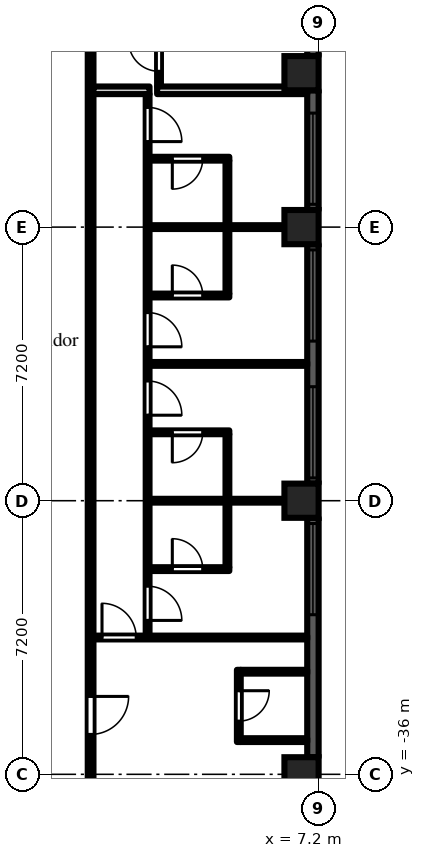
"""IFC4 building model, lengths in metres.
Left out: names, types, materials, properties, quantities, classifications, styles, units other than length and angle.
Written with IfcOpenShell. Run it as: python <this file> out.ifc"""

import sys

from ifc_helpers import new_model, si_unit, direction, frame, frame_2d, origin, origin_2d, place, context, subcontext, project, spatial, rectangle, extrude, element, fill, save


model = new_model("IFC4")
c1 = context("Model", 3, precision=1e-05, world=origin(), true_north=direction((0.0, 1.0)))
c2 = subcontext(c1, "Body", "Model", "MODEL_VIEW")
j1 = project(units=[si_unit("LENGTHUNIT", "METRE"), si_unit("PLANEANGLEUNIT", "RADIAN")], contexts=[c1])
p1 = place(None, origin())
s1 = spatial("IfcSite", under=j1, at=p1, CompositionType="ELEMENT")
p2 = place(p1, origin())
s2 = spatial("IfcBuilding", under=s1, at=p2, CompositionType="ELEMENT")
p3 = place(p2, frame((0.0, 0.0, 69.9)))
s3 = spatial("IfcBuildingStorey", under=s2, at=p3, CompositionType="ELEMENT", Elevation=69.9)
for number, where, z_axis, x_axis in (
    (1, (6.75, -36.0, 0.0), (0.0, 0.0, 1.0), (1.0, 0.0, 0.0)),
    (2, (6.75, -28.8, 0.0), (0.0, 0.0, 1.0), (1.0, 0.0, 0.0)),
    (3, (6.75, -21.6, 0.0), (0.0, 0.0, 1.0), (1.0, 0.0, 0.0)),
    (4, (6.75, -17.55, 0.0), (0.0, 0.0, 1.0), (1.0, 0.0, 0.0)),
):
    element("IfcColumn", number, at=place(p3, frame(where, z_axis=z_axis, x_axis=x_axis)), inside=s3, PredefinedType="COLUMN", context=c2, shape_type="SweptSolid", body=[
        extrude(rectangle(XDim=0.9, YDim=0.9, at=origin_2d()), origin(), (0.0, 0.0, 1.0), 3.0),
    ])
p4 = place(p3, frame((7.05, -35.55, 0.0), z_axis=(0.0, 0.0, 1.0), x_axis=(0.0, 1.0, 0.0)))
e5 = element("IfcWall", 5, at=p4, inside=s3, PredefinedType="SOLIDWALL", context=c2, shape_type="SweptSolid", body=[
    extrude(rectangle(XDim=6.3, YDim=0.3, at=frame_2d((3.15, 0.0))), origin(), (0.0, 0.0, 1.0), 2.1),
])
p5 = place(p4, frame((3.75, 0.0, 0.2)))
e6 = element("IfcOpeningElement", 6, at=p5, cuts=e5, PredefinedType="OPENING", context=c2, shape_type="SweptSolid", body=[
    extrude(rectangle(XDim=2.4, YDim=1.85, at=frame_2d((1.2, 0.925))), frame((0.0, 0.16, 0.0), z_axis=(0.0, -1.0, 0.0), x_axis=(1.0, 0.0, 0.0)), (0.0, 0.0, 1.0), 0.32),
])
p6 = place(p3, frame((7.05, -28.35, 0.0), z_axis=(0.0, 0.0, 1.0), x_axis=(0.0, 1.0, 0.0)))
e7 = element("IfcWall", 7, at=p6, inside=s3, PredefinedType="SOLIDWALL", context=c2, shape_type="SweptSolid", body=[
    extrude(rectangle(XDim=6.3, YDim=0.3, at=frame_2d((3.15, 0.0))), origin(), (0.0, 0.0, 1.0), 2.1),
])
p7 = place(p6, frame((0.15, 0.0, 0.2)))
e8 = element("IfcOpeningElement", 8, at=p7, cuts=e7, PredefinedType="OPENING", context=c2, shape_type="SweptSolid", body=[
    extrude(rectangle(XDim=2.4, YDim=1.85, at=frame_2d((1.2, 0.925))), frame((0.0, 0.16, 0.0), z_axis=(0.0, -1.0, 0.0), x_axis=(1.0, 0.0, 0.0)), (0.0, 0.0, 1.0), 0.32),
])
p8 = place(p6, frame((3.75, 0.0, 0.2)))
e9 = element("IfcOpeningElement", 9, at=p8, cuts=e7, PredefinedType="OPENING", context=c2, shape_type="SweptSolid", body=[
    extrude(rectangle(XDim=2.4, YDim=1.85, at=frame_2d((1.2, 0.925))), frame((0.0, 0.16, 0.0), z_axis=(0.0, -1.0, 0.0), x_axis=(1.0, 0.0, 0.0)), (0.0, 0.0, 1.0), 0.32),
])
p9 = place(p3, frame((7.05, -21.15, 0.0), z_axis=(0.0, 0.0, 1.0), x_axis=(0.0, 1.0, 0.0)))
e10 = element("IfcWall", 10, at=p9, inside=s3, PredefinedType="SOLIDWALL", context=c2, shape_type="SweptSolid", body=[
    extrude(rectangle(XDim=3.15, YDim=0.3, at=frame_2d((1.575, 0.0))), origin(), (0.0, 0.0, 1.0), 2.1),
])
p10 = place(p9, frame((0.15, 0.0, 0.2)))
e11 = element("IfcOpeningElement", 11, at=p10, cuts=e10, PredefinedType="OPENING", context=c2, shape_type="SweptSolid", body=[
    extrude(rectangle(XDim=2.4, YDim=1.85, at=frame_2d((1.2, 0.925))), frame((0.0, 0.16, 0.0), z_axis=(0.0, -1.0, 0.0), x_axis=(1.0, 0.0, 0.0)), (0.0, 0.0, 1.0), 0.32),
])
p11 = place(p3, frame((7.05, -17.1, 0.0), z_axis=(0.0, 0.0, 1.0), x_axis=(0.0, 1.0, 0.0)))
e12 = element("IfcWall", 12, at=p11, inside=s3, PredefinedType="SOLIDWALL", context=c2, shape_type="SweptSolid", body=[
    extrude(rectangle(XDim=1.8, YDim=0.3, at=frame_2d((0.9, 0.0))), origin(), (0.0, 0.0, 1.0), 2.1),
])
p12 = place(p11, frame((0.3, 0.0, 0.2)))
e13 = element("IfcOpeningElement", 13, at=p12, cuts=e12, PredefinedType="OPENING", context=c2, shape_type="SweptSolid", body=[
    extrude(rectangle(XDim=1.2, YDim=1.85, at=frame_2d((0.6, 0.925))), frame((0.0, 0.16, 0.0), z_axis=(0.0, -1.0, 0.0), x_axis=(1.0, 0.0, 0.0)), (0.0, 0.0, 1.0), 0.32),
])
p13 = place(p3, frame((1.2, -36.5, 0.0), z_axis=(0.0, 0.0, 1.0), x_axis=(0.0, 1.0, 0.0)))
e14 = element("IfcWall", 14, at=p13, inside=s3, PredefinedType="PARTITIONING", context=c2, shape_type="SweptSolid", body=[
    extrude(rectangle(XDim=35.375, YDim=0.15, at=frame_2d((17.688, 0.0))), origin(), (0.0, 0.0, 1.0), 2.575),
])
p14 = place(p13, frame((31.85, 0.0, 0.0)))
e15 = element("IfcOpeningElement", 15, at=p14, cuts=e14, PredefinedType="OPENING", context=c2, shape_type="SweptSolid", body=[
    extrude(rectangle(XDim=0.9, YDim=2.1, at=frame_2d((0.45, 1.05))), frame((0.0, 0.085, 0.0), z_axis=(0.0, -1.0, 0.0), x_axis=(1.0, 0.0, 0.0)), (0.0, 0.0, 1.0), 0.17),
])
p15 = place(p13, frame((23.05, 0.0, 0.0)))
e16 = element("IfcOpeningElement", 16, at=p15, cuts=e14, PredefinedType="OPENING", context=c2, shape_type="SweptSolid", body=[
    extrude(rectangle(XDim=0.9, YDim=2.1, at=frame_2d((0.45, 1.05))), frame((0.0, 0.085, 0.0), z_axis=(0.0, -1.0, 0.0), x_axis=(1.0, 0.0, 0.0)), (0.0, 0.0, 1.0), 0.17),
])
p16 = place(p13, frame((26.65, 0.0, 0.0)))
e17 = element("IfcOpeningElement", 17, at=p16, cuts=e14, PredefinedType="OPENING", context=c2, shape_type="SweptSolid", body=[
    extrude(rectangle(XDim=0.9, YDim=2.1, at=frame_2d((0.45, 1.05))), frame((0.0, 0.085, 0.0), z_axis=(0.0, -1.0, 0.0), x_axis=(1.0, 0.0, 0.0)), (0.0, 0.0, 1.0), 0.17),
])
p17 = place(p13, frame((20.5, 0.0, 0.0)))
e18 = element("IfcOpeningElement", 18, at=p17, cuts=e14, PredefinedType="OPENING", context=c2, shape_type="SweptSolid", body=[
    extrude(rectangle(XDim=1.0, YDim=2.1, at=frame_2d((0.5, 1.05))), frame((0.0, 0.085, 0.0), z_axis=(0.0, -1.0, 0.0), x_axis=(1.0, 0.0, 0.0)), (0.0, 0.0, 1.0), 0.17),
])
p18 = place(p13, frame((1.55, 0.0, 0.0)))
e19 = element("IfcOpeningElement", 19, at=p18, cuts=e14, PredefinedType="OPENING", context=c2, shape_type="SweptSolid", body=[
    extrude(rectangle(XDim=1.0, YDim=2.1, at=frame_2d((0.5, 1.05))), frame((0.0, 0.085, 0.0), z_axis=(0.0, -1.0, 0.0), x_axis=(1.0, 0.0, 0.0)), (0.0, 0.0, 1.0), 0.17),
])
p19 = place(p3, frame((1.275, -32.4, 0.0), z_axis=(0.0, 0.0, 1.0), x_axis=(1.0, 0.0, 0.0)))
e20 = element("IfcWall", 20, at=p19, inside=s3, PredefinedType="PARTITIONING", context=c2, shape_type="SweptSolid", body=[
    extrude(rectangle(XDim=5.625, YDim=0.1, at=frame_2d((2.812, 0.0))), origin(), (0.0, 0.0, 1.0), 2.575),
])
p20 = place(p19, frame((0.225, 0.0, 0.0)))
e21 = element("IfcOpeningElement", 21, at=p20, cuts=e20, PredefinedType="OPENING", context=c2, shape_type="SweptSolid", body=[
    extrude(rectangle(XDim=0.9, YDim=2.1, at=frame_2d((0.45, 1.05))), frame((0.0, 0.06, 0.0), z_axis=(0.0, -1.0, 0.0), x_axis=(1.0, 0.0, 0.0)), (0.0, 0.0, 1.0), 0.12),
])
p21 = place(p3, frame((1.275, -18.0, 0.0), z_axis=(0.0, 0.0, 1.0), x_axis=(1.0, 0.0, 0.0)))
e22 = element("IfcWall", 22, at=p21, inside=s3, PredefinedType="PARTITIONING", context=c2, shape_type="SweptSolid", body=[
    extrude(rectangle(XDim=1.475, YDim=0.2, at=frame_2d((0.738, 0.0))), origin(), (0.0, 0.0, 1.0), 2.575),
])
p22 = place(p3, frame((2.7, -32.35, 0.0), z_axis=(0.0, 0.0, 1.0), x_axis=(0.0, 1.0, 0.0)))
e23 = element("IfcWall", 23, at=p22, inside=s3, PredefinedType="PARTITIONING", context=c2, shape_type="SweptSolid", body=[
    extrude(rectangle(XDim=14.25, YDim=0.1, at=frame_2d((7.125, 0.0))), origin(), (0.0, 0.0, 1.0), 2.575),
])
p23 = place(p22, frame((0.4, 0.0, 0.0)))
e24 = element("IfcOpeningElement", 24, at=p23, cuts=e23, PredefinedType="OPENING", context=c2, shape_type="SweptSolid", body=[
    extrude(rectangle(XDim=0.9, YDim=2.1, at=frame_2d((0.45, 1.05))), frame((0.0, 0.06, 0.0), z_axis=(0.0, -1.0, 0.0), x_axis=(1.0, 0.0, 0.0)), (0.0, 0.0, 1.0), 0.12),
])
p24 = place(p22, frame((5.8, 0.0, 0.0)))
e25 = element("IfcOpeningElement", 25, at=p24, cuts=e23, PredefinedType="OPENING", context=c2, shape_type="SweptSolid", body=[
    extrude(rectangle(XDim=0.9, YDim=2.1, at=frame_2d((0.45, 1.05))), frame((0.0, 0.06, 0.0), z_axis=(0.0, -1.0, 0.0), x_axis=(1.0, 0.0, 0.0)), (0.0, 0.0, 1.0), 0.12),
])
p25 = place(p22, frame((7.6, 0.0, 0.0)))
e26 = element("IfcOpeningElement", 26, at=p25, cuts=e23, PredefinedType="OPENING", context=c2, shape_type="SweptSolid", body=[
    extrude(rectangle(XDim=0.9, YDim=2.1, at=frame_2d((0.45, 1.05))), frame((0.0, 0.06, 0.0), z_axis=(0.0, -1.0, 0.0), x_axis=(1.0, 0.0, 0.0)), (0.0, 0.0, 1.0), 0.12),
])
p26 = place(p22, frame((13.0, 0.0, 0.0)))
e27 = element("IfcOpeningElement", 27, at=p26, cuts=e23, PredefinedType="OPENING", context=c2, shape_type="SweptSolid", body=[
    extrude(rectangle(XDim=0.9, YDim=2.1, at=frame_2d((0.45, 1.05))), frame((0.0, 0.06, 0.0), z_axis=(0.0, -1.0, 0.0), x_axis=(1.0, 0.0, 0.0)), (0.0, 0.0, 1.0), 0.12),
])
p27 = place(p3, frame((2.75, -30.6, 0.0), z_axis=(0.0, 0.0, 1.0), x_axis=(1.0, 0.0, 0.0)))
e28 = element("IfcWall", 28, at=p27, inside=s3, PredefinedType="PARTITIONING", context=c2, shape_type="SweptSolid", body=[
    extrude(rectangle(XDim=2.1, YDim=0.1, at=frame_2d((1.05, 0.0))), origin(), (0.0, 0.0, 1.0), 2.575),
])
p28 = place(p27, frame((0.6, 0.0, 0.0)))
e29 = element("IfcOpeningElement", 29, at=p28, cuts=e28, PredefinedType="OPENING", context=c2, shape_type="SweptSolid", body=[
    extrude(rectangle(XDim=0.8, YDim=2.1, at=frame_2d((0.4, 1.05))), frame((0.0, 0.06, 0.0), z_axis=(0.0, -1.0, 0.0), x_axis=(1.0, 0.0, 0.0)), (0.0, 0.0, 1.0), 0.12),
])
p29 = place(p3, frame((2.75, -28.8, 0.0), z_axis=(0.0, 0.0, 1.0), x_axis=(1.0, 0.0, 0.0)))
e30 = element("IfcWall", 30, at=p29, inside=s3, PredefinedType="PARTITIONING", context=c2, shape_type="SweptSolid", body=[
    extrude(rectangle(XDim=4.15, YDim=0.1, at=frame_2d((2.075, 0.0))), origin(), (0.0, 0.0, 1.0), 2.575),
])
p30 = place(p3, frame((2.75, -27.0, 0.0), z_axis=(0.0, 0.0, 1.0), x_axis=(1.0, 0.0, 0.0)))
e31 = element("IfcWall", 31, at=p30, inside=s3, PredefinedType="PARTITIONING", context=c2, shape_type="SweptSolid", body=[
    extrude(rectangle(XDim=2.1, YDim=0.1, at=frame_2d((1.05, 0.0))), origin(), (0.0, 0.0, 1.0), 2.575),
])
p31 = place(p30, frame((0.6, 0.0, 0.0)))
e32 = element("IfcOpeningElement", 32, at=p31, cuts=e31, PredefinedType="OPENING", context=c2, shape_type="SweptSolid", body=[
    extrude(rectangle(XDim=0.8, YDim=2.1, at=frame_2d((0.4, 1.05))), frame((0.0, 0.06, 0.0), z_axis=(0.0, -1.0, 0.0), x_axis=(1.0, 0.0, 0.0)), (0.0, 0.0, 1.0), 0.12),
])
p32 = place(p3, frame((2.75, -25.2, 0.0), z_axis=(0.0, 0.0, 1.0), x_axis=(1.0, 0.0, 0.0)))
e33 = element("IfcWall", 33, at=p32, inside=s3, PredefinedType="PARTITIONING", context=c2, shape_type="SweptSolid", body=[
    extrude(rectangle(XDim=4.15, YDim=0.1, at=frame_2d((2.075, 0.0))), origin(), (0.0, 0.0, 1.0), 2.575),
])
p33 = place(p3, frame((2.75, -23.4, 0.0), z_axis=(0.0, 0.0, 1.0), x_axis=(1.0, 0.0, 0.0)))
e34 = element("IfcWall", 34, at=p33, inside=s3, PredefinedType="PARTITIONING", context=c2, shape_type="SweptSolid", body=[
    extrude(rectangle(XDim=2.1, YDim=0.1, at=frame_2d((1.05, 0.0))), origin(), (0.0, 0.0, 1.0), 2.575),
])
p34 = place(p33, frame((0.6, 0.0, 0.0)))
e35 = element("IfcOpeningElement", 35, at=p34, cuts=e34, PredefinedType="OPENING", context=c2, shape_type="SweptSolid", body=[
    extrude(rectangle(XDim=0.8, YDim=2.1, at=frame_2d((0.4, 1.05))), frame((0.0, 0.06, 0.0), z_axis=(0.0, -1.0, 0.0), x_axis=(1.0, 0.0, 0.0)), (0.0, 0.0, 1.0), 0.12),
])
p35 = place(p3, frame((2.75, -21.6, 0.0), z_axis=(0.0, 0.0, 1.0), x_axis=(1.0, 0.0, 0.0)))
e36 = element("IfcWall", 36, at=p35, inside=s3, PredefinedType="PARTITIONING", context=c2, shape_type="SweptSolid", body=[
    extrude(rectangle(XDim=4.15, YDim=0.1, at=frame_2d((2.075, 0.0))), origin(), (0.0, 0.0, 1.0), 2.575),
])
p36 = place(p3, frame((2.75, -19.8, 0.0), z_axis=(0.0, 0.0, 1.0), x_axis=(1.0, 0.0, 0.0)))
e37 = element("IfcWall", 37, at=p36, inside=s3, PredefinedType="PARTITIONING", context=c2, shape_type="SweptSolid", body=[
    extrude(rectangle(XDim=2.1, YDim=0.1, at=frame_2d((1.05, 0.0))), origin(), (0.0, 0.0, 1.0), 2.575),
])
p37 = place(p36, frame((0.6, 0.0, 0.0)))
e38 = element("IfcOpeningElement", 38, at=p37, cuts=e37, PredefinedType="OPENING", context=c2, shape_type="SweptSolid", body=[
    extrude(rectangle(XDim=0.8, YDim=2.1, at=frame_2d((0.4, 1.05))), frame((0.0, 0.06, 0.0), z_axis=(0.0, -1.0, 0.0), x_axis=(1.0, 0.0, 0.0)), (0.0, 0.0, 1.0), 0.12),
])
p38 = place(p3, frame((3.0, -17.9, 0.0), z_axis=(0.0, 0.0, 1.0), x_axis=(0.0, 1.0, 0.0)))
e39 = element("IfcWall", 39, at=p38, inside=s3, PredefinedType="PARTITIONING", context=c2, shape_type="SweptSolid", body=[
    extrude(rectangle(XDim=1.65, YDim=0.1, at=frame_2d((0.825, 0.0))), origin(), (0.0, 0.0, 1.0), 2.575),
])
p39 = place(p38, frame((0.4, 0.0, 0.0)))
e40 = element("IfcOpeningElement", 40, at=p39, cuts=e39, PredefinedType="OPENING", context=c2, shape_type="SweptSolid", body=[
    extrude(rectangle(XDim=0.8, YDim=2.1, at=frame_2d((0.4, 1.05))), frame((0.0, 0.06, 0.0), z_axis=(0.0, -1.0, 0.0), x_axis=(1.0, 0.0, 0.0)), (0.0, 0.0, 1.0), 0.12),
])
p40 = place(p3, frame((2.95, -18.0, 0.0), z_axis=(0.0, 0.0, 1.0), x_axis=(1.0, 0.0, 0.0)))
e41 = element("IfcWall", 41, at=p40, inside=s3, PredefinedType="PARTITIONING", context=c2, shape_type="SweptSolid", body=[
    extrude(rectangle(XDim=3.95, YDim=0.2, at=frame_2d((1.975, 0.0))), origin(), (0.0, 0.0, 1.0), 2.575),
])
for number, where, z_axis, x_axis in (
    (42, (4.8, -30.55, 0.0), (0.0, 0.0, 1.0), (0.0, 1.0, 0.0)),
    (43, (4.8, -23.35, 0.0), (0.0, 0.0, 1.0), (0.0, 1.0, 0.0)),
):
    element("IfcWall", number, at=place(p3, frame(where, z_axis=z_axis, x_axis=x_axis)), inside=s3, PredefinedType="PARTITIONING", context=c2, shape_type="SweptSolid", body=[
        extrude(rectangle(XDim=3.5, YDim=0.1, at=frame_2d((1.75, 0.0))), origin(), (0.0, 0.0, 1.0), 2.575),
    ])
p41 = place(p3, frame((5.1, -35.15, 0.0), z_axis=(0.0, 0.0, 1.0), x_axis=(0.0, 1.0, 0.0)))
e44 = element("IfcWall", 44, at=p41, inside=s3, PredefinedType="PARTITIONING", context=c2, shape_type="SweptSolid", body=[
    extrude(rectangle(XDim=1.9, YDim=0.1, at=frame_2d((0.95, 0.0))), origin(), (0.0, 0.0, 1.0), 2.575),
])
p42 = place(p41, frame((0.55, 0.0, 0.0)))
e45 = element("IfcOpeningElement", 45, at=p42, cuts=e44, PredefinedType="OPENING", context=c2, shape_type="SweptSolid", body=[
    extrude(rectangle(XDim=0.8, YDim=2.1, at=frame_2d((0.4, 1.05))), frame((0.0, 0.06, 0.0), z_axis=(0.0, -1.0, 0.0), x_axis=(1.0, 0.0, 0.0)), (0.0, 0.0, 1.0), 0.12),
])
for number, where, z_axis, x_axis in (
    (46, (5.15, -35.1, 0.0), (0.0, 0.0, 1.0), (1.0, 0.0, 0.0)),
    (47, (5.15, -33.3, 0.0), (0.0, 0.0, 1.0), (1.0, 0.0, 0.0)),
):
    element("IfcWall", number, at=place(p3, frame(where, z_axis=z_axis, x_axis=x_axis)), inside=s3, PredefinedType="PARTITIONING", context=c2, shape_type="SweptSolid", body=[
        extrude(rectangle(XDim=1.75, YDim=0.1, at=frame_2d((0.875, 0.0))), origin(), (0.0, 0.0, 1.0), 2.575),
    ])
p43 = place(p5, origin())
e48 = element("IfcWindow", 48, at=p43, inside=s3, PartitioningType="SINGLE_PANEL", PredefinedType="WINDOW", context=c2, shape_type="SweptSolid", body=[
    extrude(rectangle(XDim=2.4, YDim=1.85, at=frame_2d((1.2, 0.925))), frame((0.0, 0.03, 0.0), z_axis=(0.0, -1.0, 0.0), x_axis=(1.0, 0.0, 0.0)), (0.0, 0.0, 1.0), 0.06),
])
fill(e6, e48)
p44 = place(p7, origin())
e49 = element("IfcWindow", 49, at=p44, inside=s3, PartitioningType="SINGLE_PANEL", PredefinedType="WINDOW", context=c2, shape_type="SweptSolid", body=[
    extrude(rectangle(XDim=2.4, YDim=1.85, at=frame_2d((1.2, 0.925))), frame((0.0, 0.03, 0.0), z_axis=(0.0, -1.0, 0.0), x_axis=(1.0, 0.0, 0.0)), (0.0, 0.0, 1.0), 0.06),
])
fill(e8, e49)
p45 = place(p8, origin())
e50 = element("IfcWindow", 50, at=p45, inside=s3, PartitioningType="SINGLE_PANEL", PredefinedType="WINDOW", context=c2, shape_type="SweptSolid", body=[
    extrude(rectangle(XDim=2.4, YDim=1.85, at=frame_2d((1.2, 0.925))), frame((0.0, 0.03, 0.0), z_axis=(0.0, -1.0, 0.0), x_axis=(1.0, 0.0, 0.0)), (0.0, 0.0, 1.0), 0.06),
])
fill(e9, e50)
p46 = place(p10, origin())
e51 = element("IfcWindow", 51, at=p46, inside=s3, PartitioningType="SINGLE_PANEL", PredefinedType="WINDOW", context=c2, shape_type="SweptSolid", body=[
    extrude(rectangle(XDim=2.4, YDim=1.85, at=frame_2d((1.2, 0.925))), frame((0.0, 0.03, 0.0), z_axis=(0.0, -1.0, 0.0), x_axis=(1.0, 0.0, 0.0)), (0.0, 0.0, 1.0), 0.06),
])
fill(e11, e51)
p47 = place(p39, origin())
e52 = element("IfcDoor", 52, at=p47, inside=s3, OperationType="SINGLE_SWING_RIGHT", PredefinedType="DOOR", context=c2, shape_type="SweptSolid", body=[
    extrude(rectangle(XDim=0.8, YDim=2.1, at=frame_2d((0.4, 1.05))), frame((0.0, 0.025, 0.0), z_axis=(0.0, -1.0, 0.0), x_axis=(1.0, 0.0, 0.0)), (0.0, 0.0, 1.0), 0.05),
])
fill(e40, e52)
p48 = place(p42, frame((0.8, 0.0, 0.0), z_axis=(0.0, 0.0, 1.0), x_axis=(-1.0, 0.0, 0.0)))
e53 = element("IfcDoor", 53, at=p48, inside=s3, OperationType="SINGLE_SWING_LEFT", PredefinedType="DOOR", context=c2, shape_type="SweptSolid", body=[
    extrude(rectangle(XDim=0.8, YDim=2.1, at=frame_2d((0.4, 1.05))), frame((0.0, 0.025, 0.0), z_axis=(0.0, -1.0, 0.0), x_axis=(1.0, 0.0, 0.0)), (0.0, 0.0, 1.0), 0.05),
])
fill(e45, e53)
p49 = place(p18, frame((1.0, 0.0, 0.0), z_axis=(0.0, 0.0, 1.0), x_axis=(-1.0, 0.0, 0.0)))
e54 = element("IfcDoor", 54, at=p49, inside=s3, OperationType="SINGLE_SWING_LEFT", PredefinedType="DOOR", context=c2, shape_type="SweptSolid", body=[
    extrude(rectangle(XDim=1.0, YDim=2.1, at=frame_2d((0.5, 1.05))), frame((0.0, 0.025, 0.0), z_axis=(0.0, -1.0, 0.0), x_axis=(1.0, 0.0, 0.0)), (0.0, 0.0, 1.0), 0.05),
])
fill(e19, e54)
p50 = place(p20, origin())
e55 = element("IfcDoor", 55, at=p50, inside=s3, OperationType="SINGLE_SWING_LEFT", PredefinedType="DOOR", context=c2, shape_type="SweptSolid", body=[
    extrude(rectangle(XDim=0.9, YDim=2.1, at=frame_2d((0.45, 1.05))), frame((0.0, 0.025, 0.0), z_axis=(0.0, -1.0, 0.0), x_axis=(1.0, 0.0, 0.0)), (0.0, 0.0, 1.0), 0.05),
])
fill(e21, e55)
p51 = place(p23, frame((0.9, 0.0, 0.0), z_axis=(0.0, 0.0, 1.0), x_axis=(-1.0, 0.0, 0.0)))
e56 = element("IfcDoor", 56, at=p51, inside=s3, OperationType="SINGLE_SWING_RIGHT", PredefinedType="DOOR", context=c2, shape_type="SweptSolid", body=[
    extrude(rectangle(XDim=0.9, YDim=2.1, at=frame_2d((0.45, 1.05))), frame((0.0, 0.025, 0.0), z_axis=(0.0, -1.0, 0.0), x_axis=(1.0, 0.0, 0.0)), (0.0, 0.0, 1.0), 0.05),
])
fill(e24, e56)
p52 = place(p24, frame((0.9, 0.0, 0.0), z_axis=(0.0, 0.0, 1.0), x_axis=(-1.0, 0.0, 0.0)))
e57 = element("IfcDoor", 57, at=p52, inside=s3, OperationType="SINGLE_SWING_RIGHT", PredefinedType="DOOR", context=c2, shape_type="SweptSolid", body=[
    extrude(rectangle(XDim=0.9, YDim=2.1, at=frame_2d((0.45, 1.05))), frame((0.0, 0.025, 0.0), z_axis=(0.0, -1.0, 0.0), x_axis=(1.0, 0.0, 0.0)), (0.0, 0.0, 1.0), 0.05),
])
fill(e25, e57)
p53 = place(p25, frame((0.9, 0.0, 0.0), z_axis=(0.0, 0.0, 1.0), x_axis=(-1.0, 0.0, 0.0)))
e58 = element("IfcDoor", 58, at=p53, inside=s3, OperationType="SINGLE_SWING_RIGHT", PredefinedType="DOOR", context=c2, shape_type="SweptSolid", body=[
    extrude(rectangle(XDim=0.9, YDim=2.1, at=frame_2d((0.45, 1.05))), frame((0.0, 0.025, 0.0), z_axis=(0.0, -1.0, 0.0), x_axis=(1.0, 0.0, 0.0)), (0.0, 0.0, 1.0), 0.05),
])
fill(e26, e58)
p54 = place(p26, frame((0.9, 0.0, 0.0), z_axis=(0.0, 0.0, 1.0), x_axis=(-1.0, 0.0, 0.0)))
e59 = element("IfcDoor", 59, at=p54, inside=s3, OperationType="SINGLE_SWING_RIGHT", PredefinedType="DOOR", context=c2, shape_type="SweptSolid", body=[
    extrude(rectangle(XDim=0.9, YDim=2.1, at=frame_2d((0.45, 1.05))), frame((0.0, 0.025, 0.0), z_axis=(0.0, -1.0, 0.0), x_axis=(1.0, 0.0, 0.0)), (0.0, 0.0, 1.0), 0.05),
])
fill(e27, e59)
p55 = place(p37, frame((0.8, 0.0, 0.0), z_axis=(0.0, 0.0, 1.0), x_axis=(-1.0, 0.0, 0.0)))
e60 = element("IfcDoor", 60, at=p55, inside=s3, OperationType="SINGLE_SWING_RIGHT", PredefinedType="DOOR", context=c2, shape_type="SweptSolid", body=[
    extrude(rectangle(XDim=0.8, YDim=2.1, at=frame_2d((0.4, 1.05))), frame((0.0, 0.025, 0.0), z_axis=(0.0, -1.0, 0.0), x_axis=(1.0, 0.0, 0.0)), (0.0, 0.0, 1.0), 0.05),
])
fill(e38, e60)
p56 = place(p34, origin())
e61 = element("IfcDoor", 61, at=p56, inside=s3, OperationType="SINGLE_SWING_LEFT", PredefinedType="DOOR", context=c2, shape_type="SweptSolid", body=[
    extrude(rectangle(XDim=0.8, YDim=2.1, at=frame_2d((0.4, 1.05))), frame((0.0, 0.025, 0.0), z_axis=(0.0, -1.0, 0.0), x_axis=(1.0, 0.0, 0.0)), (0.0, 0.0, 1.0), 0.05),
])
fill(e35, e61)
p57 = place(p31, frame((0.8, 0.0, 0.0), z_axis=(0.0, 0.0, 1.0), x_axis=(-1.0, 0.0, 0.0)))
e62 = element("IfcDoor", 62, at=p57, inside=s3, OperationType="SINGLE_SWING_RIGHT", PredefinedType="DOOR", context=c2, shape_type="SweptSolid", body=[
    extrude(rectangle(XDim=0.8, YDim=2.1, at=frame_2d((0.4, 1.05))), frame((0.0, 0.025, 0.0), z_axis=(0.0, -1.0, 0.0), x_axis=(1.0, 0.0, 0.0)), (0.0, 0.0, 1.0), 0.05),
])
fill(e32, e62)
p58 = place(p28, origin())
e63 = element("IfcDoor", 63, at=p58, inside=s3, OperationType="SINGLE_SWING_LEFT", PredefinedType="DOOR", context=c2, shape_type="SweptSolid", body=[
    extrude(rectangle(XDim=0.8, YDim=2.1, at=frame_2d((0.4, 1.05))), frame((0.0, 0.025, 0.0), z_axis=(0.0, -1.0, 0.0), x_axis=(1.0, 0.0, 0.0)), (0.0, 0.0, 1.0), 0.05),
])
fill(e29, e63)
save(model, sys.argv[1])
